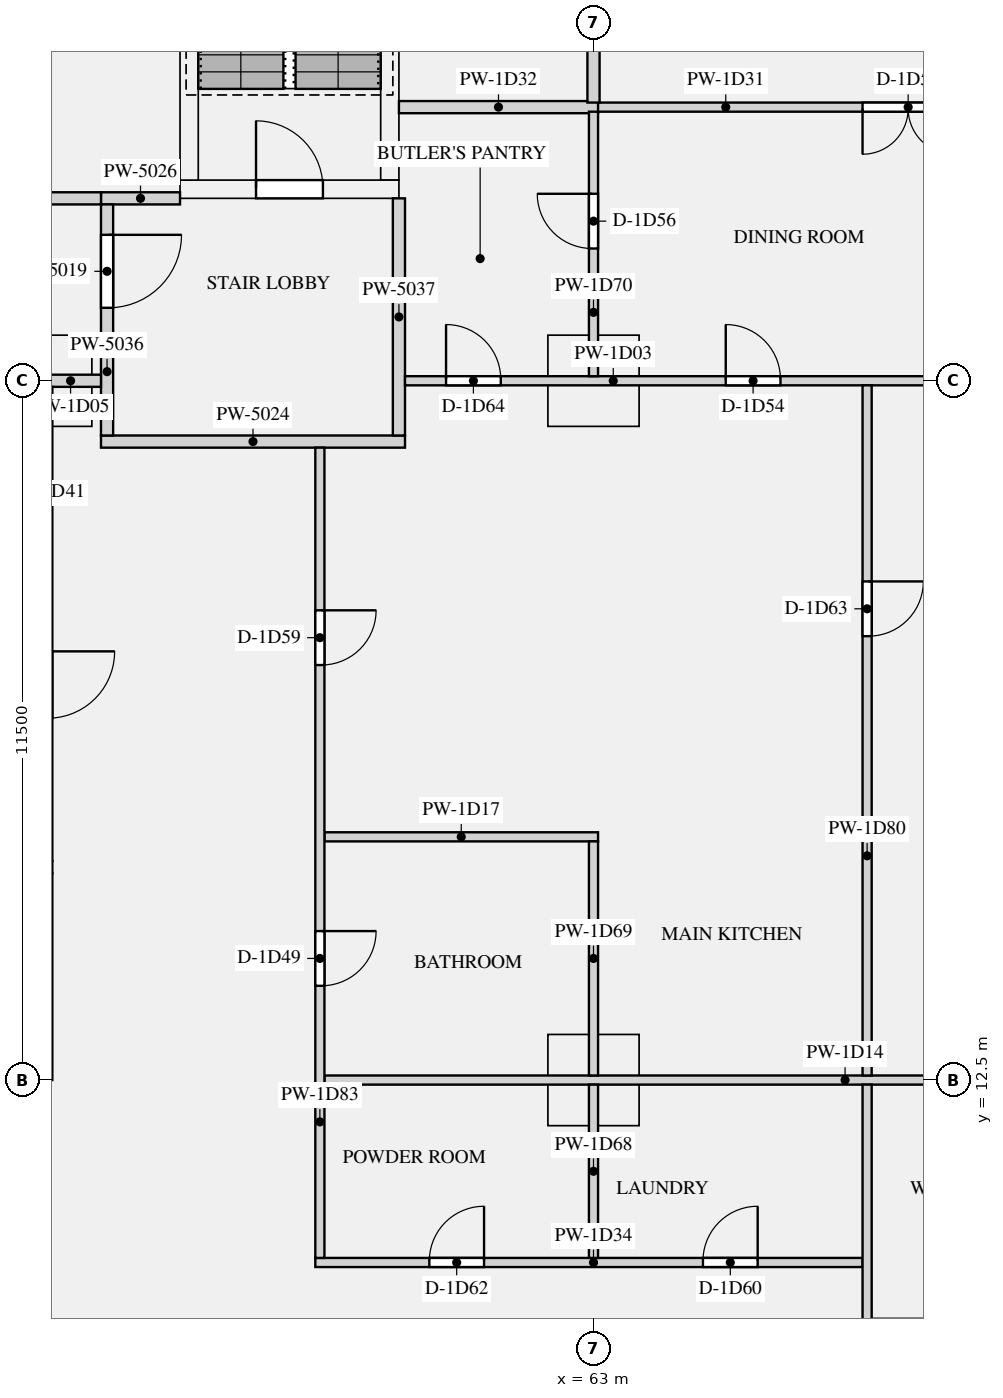
"""IFC4 building model, lengths in metres.
Left out: names, types, materials, properties, quantities, classifications, styles, units other than length and angle.
Written with IfcOpenShell. Run it as: python <this file> out.ifc"""

import sys

from ifc_helpers import new_model, si_unit, direction, frame, frame_2d, origin, origin_2d, place, context, subcontext, project, spatial, rectangle, extrude, element, fill, save


model = new_model("IFC4")
c1 = context("Model", 3, precision=1e-05, world=origin(), true_north=direction((0.0, 1.0)))
c2 = subcontext(c1, "Body", "Model", "MODEL_VIEW")
j1 = project(units=[si_unit("LENGTHUNIT", "METRE"), si_unit("PLANEANGLEUNIT", "RADIAN")], contexts=[c1])
p1 = place(None, origin())
s1 = spatial("IfcSite", under=j1, at=p1, CompositionType="ELEMENT")
p2 = place(p1, origin())
s2 = spatial("IfcBuilding", under=s1, at=p2, CompositionType="ELEMENT")
p3 = place(p2, frame((0.0, 0.0, 47.85)))
s3 = spatial("IfcBuildingStorey", under=s2, at=p3, CompositionType="ELEMENT", Elevation=47.85)
for number, where, z_axis, x_axis in (
    (1, (54.0, 24.0, 0.0), (0.0, 0.0, 1.0), (1.0, 0.0, 0.0)),
    (2, (63.0, 24.0, 0.0), (0.0, 0.0, 1.0), (1.0, 0.0, 0.0)),
    (3, (63.0, 12.5, 0.0), (0.0, 0.0, 1.0), (1.0, 0.0, 0.0)),
):
    element("IfcColumn", number, at=place(p3, frame(where, z_axis=z_axis, x_axis=x_axis)), inside=s3, PredefinedType="COLUMN", context=c2, shape_type="SweptSolid", body=[
        extrude(rectangle(XDim=1.5, YDim=1.5, at=origin_2d()), origin(), (0.0, 0.0, 1.0), 3.15),
    ])
p4 = place(p3, frame((56.2, 27.15, 0.0), z_axis=(0.0, 0.0, 1.0), x_axis=(1.0, 0.0, 0.0)))
e4 = element("IfcWall", 4, at=p4, inside=s3, PredefinedType="SHEAR", context=c2, shape_type="SweptSolid", body=[
    extrude(rectangle(XDim=3.6, YDim=0.3, at=frame_2d((1.8, 0.0))), origin(), (0.0, 0.0, 1.0), 3.15),
])
p5 = place(p4, frame((1.25, 0.0, 0.0)))
e5 = element("IfcOpeningElement", 5, at=p5, cuts=e4, PredefinedType="OPENING", context=c2, shape_type="SweptSolid", body=[
    extrude(rectangle(XDim=1.1, YDim=2.1, at=frame_2d((0.55, 1.05))), frame((0.0, 0.16, 0.0), z_axis=(0.0, -1.0, 0.0), x_axis=(1.0, 0.0, 0.0)), (0.0, 0.0, 1.0), 0.32),
])
for number, where, z_axis, x_axis in (
    (6, (56.35, 27.3, 0.0), (0.0, 0.0, 1.0), (0.0, 1.0, 0.0)),
    (7, (59.65, 27.3, 0.0), (0.0, 0.0, 1.0), (0.0, 1.0, 0.0)),
):
    element("IfcWall", number, at=place(p3, frame(where, z_axis=z_axis, x_axis=x_axis)), inside=s3, PredefinedType="SHEAR", context=c2, shape_type="SweptSolid", body=[
        extrude(rectangle(XDim=7.8, YDim=0.3, at=frame_2d((3.9, 0.0))), origin(), (0.0, 0.0, 1.0), 3.15),
    ])
p6 = place(p3, frame((54.9, 23.0, 0.0), z_axis=(0.0, 0.0, 1.0), x_axis=(1.0, 0.0, 0.0)))
e8 = element("IfcWall", 8, at=p6, inside=s3, PredefinedType="PARTITIONING", context=c2, shape_type="SweptSolid", body=[
    extrude(rectangle(XDim=5.0, YDim=0.2, at=frame_2d((2.5, 0.0))), origin(), (0.0, 0.0, 1.0), 2.83),
])
p7 = place(p3, frame((54.9, 27.0, 0.0), z_axis=(0.0, 0.0, 1.0), x_axis=(1.0, 0.0, 0.0)))
e9 = element("IfcWall", 9, at=p7, inside=s3, PredefinedType="PARTITIONING", context=c2, shape_type="SweptSolid", body=[
    extrude(rectangle(XDim=1.3, YDim=0.2, at=frame_2d((0.65, 0.0))), origin(), (0.0, 0.0, 1.0), 2.83),
])
p8 = place(p3, frame((55.0, 23.1, 0.0), z_axis=(0.0, 0.0, 1.0), x_axis=(0.0, 1.0, 0.0)))
e10 = element("IfcWall", 10, at=p8, inside=s3, PredefinedType="PARTITIONING", context=c2, shape_type="SweptSolid", body=[
    extrude(rectangle(XDim=3.8, YDim=0.2, at=frame_2d((1.9, 0.0))), origin(), (0.0, 0.0, 1.0), 2.83),
])
p9 = place(p8, frame((2.1, 0.0, 0.0)))
e11 = element("IfcOpeningElement", 11, at=p9, cuts=e10, PredefinedType="OPENING", context=c2, shape_type="SweptSolid", body=[
    extrude(rectangle(XDim=1.2, YDim=2.1, at=frame_2d((0.6, 1.05))), frame((0.0, 0.11, 0.0), z_axis=(0.0, -1.0, 0.0), x_axis=(1.0, 0.0, 0.0)), (0.0, 0.0, 1.0), 0.22),
])
p10 = place(p3, frame((59.8, 23.1, 0.0), z_axis=(0.0, 0.0, 1.0), x_axis=(0.0, 1.0, 0.0)))
e12 = element("IfcWall", 12, at=p10, inside=s3, PredefinedType="PARTITIONING", context=c2, shape_type="SweptSolid", body=[
    extrude(rectangle(XDim=3.9, YDim=0.2, at=frame_2d((1.95, 0.0))), origin(), (0.0, 0.0, 1.0), 2.83),
])
p11 = place(p3, frame((59.9, 24.0, 0.0), z_axis=(0.0, 0.0, 1.0), x_axis=(1.0, 0.0, 0.0)))
e13 = element("IfcWall", 13, at=p11, inside=s3, PredefinedType="PARTITIONING", context=c2, shape_type="SweptSolid", body=[
    extrude(rectangle(XDim=13.3, YDim=0.15, at=frame_2d((6.65, 0.0))), origin(), (0.0, 0.0, 1.0), 2.83),
])
p12 = place(p11, frame((5.275, 0.0, 0.0)))
e14 = element("IfcOpeningElement", 14, at=p12, cuts=e13, PredefinedType="OPENING", context=c2, shape_type="SweptSolid", body=[
    extrude(rectangle(XDim=0.9, YDim=2.1, at=frame_2d((0.45, 1.05))), frame((0.0, 0.085, 0.0), z_axis=(0.0, -1.0, 0.0), x_axis=(1.0, 0.0, 0.0)), (0.0, 0.0, 1.0), 0.17),
])
p13 = place(p11, frame((8.725, 0.0, 0.0)))
e15 = element("IfcOpeningElement", 15, at=p13, cuts=e13, PredefinedType="OPENING", context=c2, shape_type="SweptSolid", body=[
    extrude(rectangle(XDim=1.5, YDim=2.1, at=frame_2d((0.75, 1.05))), frame((0.0, 0.085, 0.0), z_axis=(0.0, -1.0, 0.0), x_axis=(1.0, 0.0, 0.0)), (0.0, 0.0, 1.0), 0.17),
])
p14 = place(p11, frame((0.675, 0.0, 0.0)))
e16 = element("IfcOpeningElement", 16, at=p14, cuts=e13, PredefinedType="OPENING", context=c2, shape_type="SweptSolid", body=[
    extrude(rectangle(XDim=0.9, YDim=2.1, at=frame_2d((0.45, 1.05))), frame((0.0, 0.085, 0.0), z_axis=(0.0, -1.0, 0.0), x_axis=(1.0, 0.0, 0.0)), (0.0, 0.0, 1.0), 0.17),
])
p15 = place(p3, frame((53.9, 24.0, 0.0), z_axis=(0.0, 0.0, 1.0), x_axis=(1.0, 0.0, 0.0)))
e17 = element("IfcWall", 17, at=p15, inside=s3, PredefinedType="PARTITIONING", context=c2, shape_type="SweptSolid", body=[
    extrude(rectangle(XDim=1.0, YDim=0.2, at=frame_2d((0.5, 0.0))), origin(), (0.0, 0.0, 1.0), 2.83),
])
p16 = place(p3, frame((47.9, 27.0, 0.0), z_axis=(0.0, 0.0, 1.0), x_axis=(1.0, 0.0, 0.0)))
e18 = element("IfcWall", 18, at=p16, inside=s3, PredefinedType="PARTITIONING", context=c2, shape_type="SweptSolid", body=[
    extrude(rectangle(XDim=7.0, YDim=0.2, at=frame_2d((3.5, 0.0))), origin(), (0.0, 0.0, 1.0), 2.83),
])
p17 = place(p3, frame((58.575, 12.5, 0.0), z_axis=(0.0, 0.0, 1.0), x_axis=(1.0, 0.0, 0.0)))
e19 = element("IfcWall", 19, at=p17, inside=s3, PredefinedType="PARTITIONING", context=c2, shape_type="SweptSolid", body=[
    extrude(rectangle(XDim=17.125, YDim=0.15, at=frame_2d((8.562, 0.0))), origin(), (0.0, 0.0, 1.0), 2.83),
])
p18 = place(p3, frame((58.575, 16.5, 0.0), z_axis=(0.0, 0.0, 1.0), x_axis=(1.0, 0.0, 0.0)))
e20 = element("IfcWall", 20, at=p18, inside=s3, PredefinedType="PARTITIONING", context=c2, shape_type="SweptSolid", body=[
    extrude(rectangle(XDim=4.5, YDim=0.15, at=frame_2d((2.25, 0.0))), origin(), (0.0, 0.0, 1.0), 2.83),
])
p19 = place(p3, frame((62.925, 28.5, 0.0), z_axis=(0.0, 0.0, 1.0), x_axis=(1.0, 0.0, 0.0)))
e21 = element("IfcWall", 21, at=p19, inside=s3, PredefinedType="PARTITIONING", context=c2, shape_type="SweptSolid", body=[
    extrude(rectangle(XDim=10.275, YDim=0.15, at=frame_2d((5.137, 0.0))), origin(), (0.0, 0.0, 1.0), 2.83),
])
p20 = place(p19, frame((4.5, 0.0, 0.0)))
e22 = element("IfcOpeningElement", 22, at=p20, cuts=e21, PredefinedType="OPENING", context=c2, shape_type="SweptSolid", body=[
    extrude(rectangle(XDim=1.5, YDim=2.1, at=frame_2d((0.75, 1.05))), frame((0.0, 0.085, 0.0), z_axis=(0.0, -1.0, 0.0), x_axis=(1.0, 0.0, 0.0)), (0.0, 0.0, 1.0), 0.17),
])
p21 = place(p3, frame((59.8, 28.5, 0.0), z_axis=(0.0, 0.0, 1.0), x_axis=(1.0, 0.0, 0.0)))
e23 = element("IfcWall", 23, at=p21, inside=s3, PredefinedType="PARTITIONING", context=c2, shape_type="SweptSolid", body=[
    extrude(rectangle(XDim=3.275, YDim=0.2, at=frame_2d((1.637, 0.0))), origin(), (0.0, 0.0, 1.0), 2.83),
])
p22 = place(p3, frame((58.425, 9.5, 0.0), z_axis=(0.0, 0.0, 1.0), x_axis=(1.0, 0.0, 0.0)))
e24 = element("IfcWall", 24, at=p22, inside=s3, PredefinedType="PARTITIONING", context=c2, shape_type="SweptSolid", body=[
    extrude(rectangle(XDim=9.0, YDim=0.15, at=frame_2d((4.5, 0.0))), origin(), (0.0, 0.0, 1.0), 2.83),
])
p23 = place(p22, frame((6.375, 0.0, 0.0)))
e25 = element("IfcOpeningElement", 25, at=p23, cuts=e24, PredefinedType="OPENING", context=c2, shape_type="SweptSolid", body=[
    extrude(rectangle(XDim=0.9, YDim=2.1, at=frame_2d((0.45, 1.05))), frame((0.0, 0.085, 0.0), z_axis=(0.0, -1.0, 0.0), x_axis=(1.0, 0.0, 0.0)), (0.0, 0.0, 1.0), 0.17),
])
p24 = place(p22, frame((1.875, 0.0, 0.0)))
e26 = element("IfcOpeningElement", 26, at=p24, cuts=e24, PredefinedType="OPENING", context=c2, shape_type="SweptSolid", body=[
    extrude(rectangle(XDim=0.9, YDim=2.1, at=frame_2d((0.45, 1.05))), frame((0.0, 0.085, 0.0), z_axis=(0.0, -1.0, 0.0), x_axis=(1.0, 0.0, 0.0)), (0.0, 0.0, 1.0), 0.17),
])
p25 = place(p3, frame((63.0, 9.575, 0.0), z_axis=(0.0, 0.0, 1.0), x_axis=(0.0, 1.0, 0.0)))
e27 = element("IfcWall", 27, at=p25, inside=s3, PredefinedType="PARTITIONING", context=c2, shape_type="SweptSolid", body=[
    extrude(rectangle(XDim=2.85, YDim=0.15, at=frame_2d((1.425, 0.0))), origin(), (0.0, 0.0, 1.0), 2.83),
])
p26 = place(p3, frame((63.0, 12.575, 0.0), z_axis=(0.0, 0.0, 1.0), x_axis=(0.0, 1.0, 0.0)))
e28 = element("IfcWall", 28, at=p26, inside=s3, PredefinedType="PARTITIONING", context=c2, shape_type="SweptSolid", body=[
    extrude(rectangle(XDim=3.85, YDim=0.15, at=frame_2d((1.925, 0.0))), origin(), (0.0, 0.0, 1.0), 2.83),
])
p27 = place(p3, frame((63.0, 24.075, 0.0), z_axis=(0.0, 0.0, 1.0), x_axis=(0.0, 1.0, 0.0)))
e29 = element("IfcWall", 29, at=p27, inside=s3, PredefinedType="PARTITIONING", context=c2, shape_type="SweptSolid", body=[
    extrude(rectangle(XDim=4.35, YDim=0.15, at=frame_2d((2.175, 0.0))), origin(), (0.0, 0.0, 1.0), 2.83),
])
p28 = place(p27, frame((2.1, 0.0, 0.0)))
e30 = element("IfcOpeningElement", 30, at=p28, cuts=e29, PredefinedType="OPENING", context=c2, shape_type="SweptSolid", body=[
    extrude(rectangle(XDim=0.9, YDim=2.1, at=frame_2d((0.45, 1.05))), frame((0.0, 0.085, 0.0), z_axis=(0.0, -1.0, 0.0), x_axis=(1.0, 0.0, 0.0)), (0.0, 0.0, 1.0), 0.17),
])
p29 = place(p3, frame((63.0, 28.575, 0.0), z_axis=(0.0, 0.0, 1.0), x_axis=(0.0, 1.0, 0.0)))
e31 = element("IfcWall", 31, at=p29, inside=s3, PredefinedType="PARTITIONING", context=c2, shape_type="SweptSolid", body=[
    extrude(rectangle(XDim=3.7, YDim=0.2, at=frame_2d((1.85, 0.0))), origin(), (0.0, 0.0, 1.0), 2.83),
])
p30 = place(p3, frame((67.5, 0.8, 0.0), z_axis=(0.0, 0.0, 1.0), x_axis=(0.0, 1.0, 0.0)))
e32 = element("IfcWall", 32, at=p30, inside=s3, PredefinedType="PARTITIONING", context=c2, shape_type="SweptSolid", body=[
    extrude(rectangle(XDim=11.625, YDim=0.15, at=frame_2d((5.812, 0.0))), origin(), (0.0, 0.0, 1.0), 2.83),
])
p31 = place(p30, frame((6.25, 0.0, 0.0)))
e33 = element("IfcOpeningElement", 33, at=p31, cuts=e32, PredefinedType="OPENING", context=c2, shape_type="SweptSolid", body=[
    extrude(rectangle(XDim=0.9, YDim=2.1, at=frame_2d((0.45, 1.05))), frame((0.0, 0.085, 0.0), z_axis=(0.0, -1.0, 0.0), x_axis=(1.0, 0.0, 0.0)), (0.0, 0.0, 1.0), 0.17),
])
p32 = place(p3, frame((67.5, 12.575, 0.0), z_axis=(0.0, 0.0, 1.0), x_axis=(0.0, 1.0, 0.0)))
e34 = element("IfcWall", 34, at=p32, inside=s3, PredefinedType="PARTITIONING", context=c2, shape_type="SweptSolid", body=[
    extrude(rectangle(XDim=11.35, YDim=0.15, at=frame_2d((5.675, 0.0))), origin(), (0.0, 0.0, 1.0), 2.83),
])
p33 = place(p32, frame((7.225, 0.0, 0.0)))
e35 = element("IfcOpeningElement", 35, at=p33, cuts=e34, PredefinedType="OPENING", context=c2, shape_type="SweptSolid", body=[
    extrude(rectangle(XDim=0.9, YDim=2.1, at=frame_2d((0.45, 1.05))), frame((0.0, 0.085, 0.0), z_axis=(0.0, -1.0, 0.0), x_axis=(1.0, 0.0, 0.0)), (0.0, 0.0, 1.0), 0.17),
])
p34 = place(p3, frame((58.5, 9.575, 0.0), z_axis=(0.0, 0.0, 1.0), x_axis=(0.0, 1.0, 0.0)))
e36 = element("IfcWall", 36, at=p34, inside=s3, PredefinedType="PARTITIONING", context=c2, shape_type="SweptSolid", body=[
    extrude(rectangle(XDim=13.325, YDim=0.15, at=frame_2d((6.663, 0.0))), origin(), (0.0, 0.0, 1.0), 2.83),
])
p35 = place(p34, frame((4.475, 0.0, 0.0)))
e37 = element("IfcOpeningElement", 37, at=p35, cuts=e36, PredefinedType="OPENING", context=c2, shape_type="SweptSolid", body=[
    extrude(rectangle(XDim=0.9, YDim=2.1, at=frame_2d((0.45, 1.05))), frame((0.0, 0.085, 0.0), z_axis=(0.0, -1.0, 0.0), x_axis=(1.0, 0.0, 0.0)), (0.0, 0.0, 1.0), 0.17),
])
p36 = place(p34, frame((9.75, 0.0, 0.0)))
e38 = element("IfcOpeningElement", 38, at=p36, cuts=e36, PredefinedType="OPENING", context=c2, shape_type="SweptSolid", body=[
    extrude(rectangle(XDim=0.9, YDim=2.1, at=frame_2d((0.45, 1.05))), frame((0.0, 0.085, 0.0), z_axis=(0.0, -1.0, 0.0), x_axis=(1.0, 0.0, 0.0)), (0.0, 0.0, 1.0), 0.17),
])
p37 = place(p5, origin())
e39 = element("IfcDoor", 39, at=p37, inside=s3, OperationType="SINGLE_SWING_LEFT", PredefinedType="DOOR", context=c2, shape_type="SweptSolid", body=[
    extrude(rectangle(XDim=1.1, YDim=2.1, at=frame_2d((0.55, 1.05))), frame((0.0, 0.025, 0.0), z_axis=(0.0, -1.0, 0.0), x_axis=(1.0, 0.0, 0.0)), (0.0, 0.0, 1.0), 0.05),
])
fill(e5, e39)
p38 = place(p9, frame((1.2, 0.0, 0.0), z_axis=(0.0, 0.0, 1.0), x_axis=(-1.0, 0.0, 0.0)))
e40 = element("IfcDoor", 40, at=p38, inside=s3, OperationType="SINGLE_SWING_LEFT", PredefinedType="DOOR", context=c2, shape_type="SweptSolid", body=[
    extrude(rectangle(XDim=1.2, YDim=2.1, at=frame_2d((0.6, 1.05))), frame((0.0, 0.025, 0.0), z_axis=(0.0, -1.0, 0.0), x_axis=(1.0, 0.0, 0.0)), (0.0, 0.0, 1.0), 0.05),
])
fill(e11, e40)
p39 = place(p35, frame((0.9, 0.0, 0.0), z_axis=(0.0, 0.0, 1.0), x_axis=(-1.0, 0.0, 0.0)))
e41 = element("IfcDoor", 41, at=p39, inside=s3, OperationType="SINGLE_SWING_LEFT", PredefinedType="DOOR", context=c2, shape_type="SweptSolid", body=[
    extrude(rectangle(XDim=0.9, YDim=2.1, at=frame_2d((0.45, 1.05))), frame((0.0, 0.025, 0.0), z_axis=(0.0, -1.0, 0.0), x_axis=(1.0, 0.0, 0.0)), (0.0, 0.0, 1.0), 0.05),
])
fill(e37, e41)
p40 = place(p20, frame((1.5, 0.0, 0.0), z_axis=(0.0, 0.0, 1.0), x_axis=(-1.0, 0.0, 0.0)))
e42 = element("IfcDoor", 42, at=p40, inside=s3, OperationType="DOUBLE_DOOR_SINGLE_SWING", PredefinedType="DOOR", context=c2, shape_type="SweptSolid", body=[
    extrude(rectangle(XDim=1.5, YDim=2.1, at=frame_2d((0.75, 1.05))), frame((0.0, 0.025, 0.0), z_axis=(0.0, -1.0, 0.0), x_axis=(1.0, 0.0, 0.0)), (0.0, 0.0, 1.0), 0.05),
])
fill(e22, e42)
p41 = place(p12, origin())
e43 = element("IfcDoor", 43, at=p41, inside=s3, OperationType="SINGLE_SWING_LEFT", PredefinedType="DOOR", context=c2, shape_type="SweptSolid", body=[
    extrude(rectangle(XDim=0.9, YDim=2.1, at=frame_2d((0.45, 1.05))), frame((0.0, 0.025, 0.0), z_axis=(0.0, -1.0, 0.0), x_axis=(1.0, 0.0, 0.0)), (0.0, 0.0, 1.0), 0.05),
])
fill(e14, e43)
p42 = place(p28, origin())
e44 = element("IfcDoor", 44, at=p42, inside=s3, OperationType="SINGLE_SWING_RIGHT", PredefinedType="DOOR", context=c2, shape_type="SweptSolid", body=[
    extrude(rectangle(XDim=0.9, YDim=2.1, at=frame_2d((0.45, 1.05))), frame((0.0, 0.025, 0.0), z_axis=(0.0, -1.0, 0.0), x_axis=(1.0, 0.0, 0.0)), (0.0, 0.0, 1.0), 0.05),
])
fill(e30, e44)
p43 = place(p36, frame((0.9, 0.0, 0.0), z_axis=(0.0, 0.0, 1.0), x_axis=(-1.0, 0.0, 0.0)))
e45 = element("IfcDoor", 45, at=p43, inside=s3, OperationType="SINGLE_SWING_LEFT", PredefinedType="DOOR", context=c2, shape_type="SweptSolid", body=[
    extrude(rectangle(XDim=0.9, YDim=2.1, at=frame_2d((0.45, 1.05))), frame((0.0, 0.025, 0.0), z_axis=(0.0, -1.0, 0.0), x_axis=(1.0, 0.0, 0.0)), (0.0, 0.0, 1.0), 0.05),
])
fill(e38, e45)
p44 = place(p23, origin())
e46 = element("IfcDoor", 46, at=p44, inside=s3, OperationType="SINGLE_SWING_RIGHT", PredefinedType="DOOR", context=c2, shape_type="SweptSolid", body=[
    extrude(rectangle(XDim=0.9, YDim=2.1, at=frame_2d((0.45, 1.05))), frame((0.0, 0.025, 0.0), z_axis=(0.0, -1.0, 0.0), x_axis=(1.0, 0.0, 0.0)), (0.0, 0.0, 1.0), 0.05),
])
fill(e25, e46)
p45 = place(p24, origin())
e47 = element("IfcDoor", 47, at=p45, inside=s3, OperationType="SINGLE_SWING_RIGHT", PredefinedType="DOOR", context=c2, shape_type="SweptSolid", body=[
    extrude(rectangle(XDim=0.9, YDim=2.1, at=frame_2d((0.45, 1.05))), frame((0.0, 0.025, 0.0), z_axis=(0.0, -1.0, 0.0), x_axis=(1.0, 0.0, 0.0)), (0.0, 0.0, 1.0), 0.05),
])
fill(e26, e47)
p46 = place(p33, frame((0.9, 0.0, 0.0), z_axis=(0.0, 0.0, 1.0), x_axis=(-1.0, 0.0, 0.0)))
e48 = element("IfcDoor", 48, at=p46, inside=s3, OperationType="SINGLE_SWING_LEFT", PredefinedType="DOOR", context=c2, shape_type="SweptSolid", body=[
    extrude(rectangle(XDim=0.9, YDim=2.1, at=frame_2d((0.45, 1.05))), frame((0.0, 0.025, 0.0), z_axis=(0.0, -1.0, 0.0), x_axis=(1.0, 0.0, 0.0)), (0.0, 0.0, 1.0), 0.05),
])
fill(e35, e48)
p47 = place(p14, origin())
e49 = element("IfcDoor", 49, at=p47, inside=s3, OperationType="SINGLE_SWING_LEFT", PredefinedType="DOOR", context=c2, shape_type="SweptSolid", body=[
    extrude(rectangle(XDim=0.9, YDim=2.1, at=frame_2d((0.45, 1.05))), frame((0.0, 0.025, 0.0), z_axis=(0.0, -1.0, 0.0), x_axis=(1.0, 0.0, 0.0)), (0.0, 0.0, 1.0), 0.05),
])
fill(e16, e49)
save(model, sys.argv[1])
